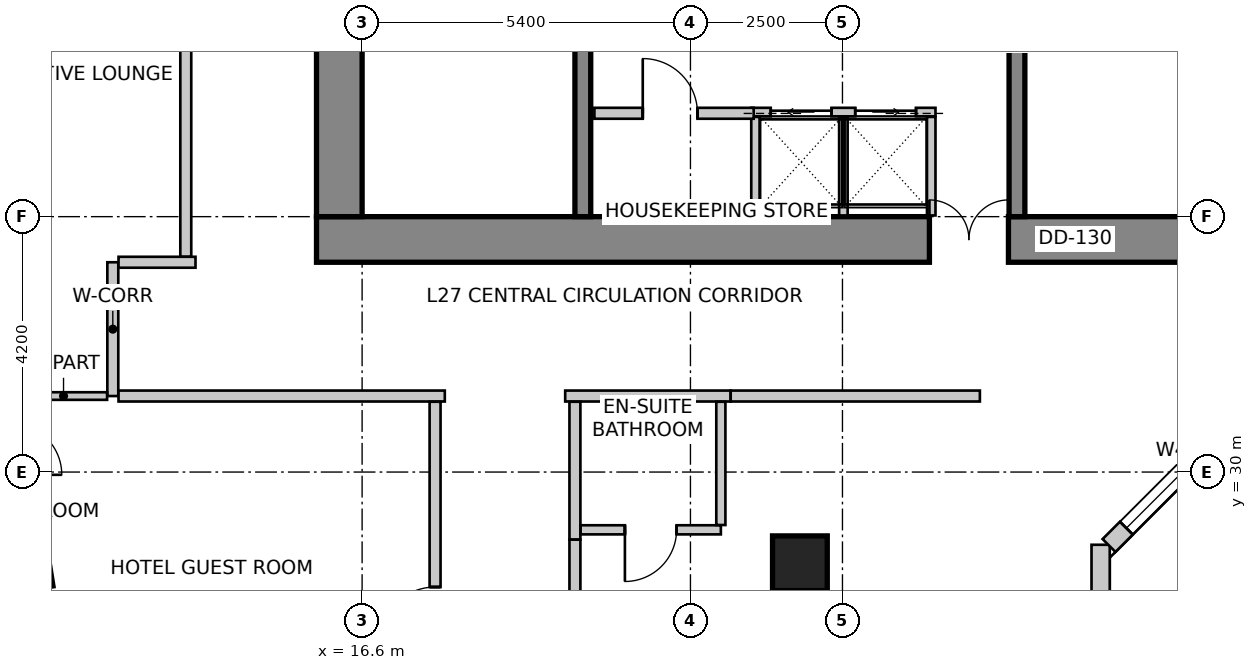
"""IFC4 building model, lengths in metres.
Left out: names, types, materials, properties, quantities, classifications, styles, units other than length and angle.
Written with IfcOpenShell. Run it as: python <this file> out.ifc"""

import sys

from ifc_helpers import new_model, si_unit, direction, frame, frame_2d, origin, origin_2d, place, context, subcontext, project, spatial, rectangle, extrude, source, transform, mapped, element, fill, save


model = new_model("IFC4")
c1 = context("Model", 3, precision=1e-05, world=origin(), true_north=direction((0.0, 1.0)))
c2 = subcontext(c1, "Body", "Model", "MODEL_VIEW")
j1 = project(units=[si_unit("LENGTHUNIT", "METRE"), si_unit("PLANEANGLEUNIT", "RADIAN")], contexts=[c1])
p1 = place(None, origin())
s1 = spatial("IfcSite", under=j1, at=p1, CompositionType="ELEMENT")
p2 = place(p1, origin())
s2 = spatial("IfcBuilding", under=s1, at=p2, CompositionType="ELEMENT")
p3 = place(p2, frame((0.0, 0.0, 114.2)))
s3 = spatial("IfcBuildingStorey", under=s2, at=p3, CompositionType="ELEMENT", Elevation=114.2)
p4 = place(p3, frame((15.85, 33.825, 0.0), z_axis=(0.0, 0.0, 1.0), x_axis=(1.0, 0.0, 0.0)))
e1 = element("IfcWall", 1, at=p4, inside=s3, PredefinedType="SHEAR", context=c2, shape_type="SweptSolid", body=[
    extrude(rectangle(XDim=15.9, YDim=0.75, at=frame_2d((7.95, 0.0))), origin(), (0.0, 0.0, 1.0), 3.6),
])
m1 = source(origin(), c2, "Body", "SweptSolid", [
    extrude(rectangle(XDim=1.3, YDim=2.15, at=frame_2d((0.65, 1.075))), frame((0.0, 0.385, 0.0), z_axis=(0.0, -1.0, 0.0), x_axis=(1.0, 0.0, 0.0)), (0.0, 0.0, 1.0), 0.77),
])
p5 = place(p4, frame((10.08, 0.0, 0.0)))
e2 = element("IfcOpeningElement", 2, at=p5, cuts=e1, PredefinedType="OPENING", context=c2, shape_type="MappedRepresentation", body=[
    mapped(m1, transform((0.0, 0.0, 0.0), scale=1.0)),
])
p6 = place(p3, frame((16.225, 34.2, 0.0), z_axis=(0.0, 0.0, 1.0), x_axis=(0.0, 1.0, 0.0)))
e3 = element("IfcWall", 3, at=p6, inside=s3, PredefinedType="SHEAR", context=c2, shape_type="SweptSolid", body=[
    extrude(rectangle(XDim=11.4, YDim=0.75, at=frame_2d((5.7, 0.0))), origin(), (0.0, 0.0, 1.0), 3.6),
])
m2 = source(origin(), c2, "Body", "SweptSolid", [
    extrude(rectangle(XDim=1.1, YDim=2.15, at=frame_2d((0.55, 1.075))), frame((0.0, 0.385, 0.0), z_axis=(0.0, -1.0, 0.0), x_axis=(1.0, 0.0, 0.0)), (0.0, 0.0, 1.0), 0.77),
])
p7 = place(p6, frame((7.15, 0.0, 0.0)))
e4 = element("IfcOpeningElement", 4, at=p7, cuts=e3, PredefinedType="OPENING", context=c2, shape_type="MappedRepresentation", body=[
    mapped(m2, transform((0.0, 0.0, 0.0), scale=1.0)),
])
p8 = place(p3, frame((20.23, 34.2, 0.0), z_axis=(0.0, 0.0, 1.0), x_axis=(0.0, 1.0, 0.0)))
e5 = element("IfcWall", 5, at=p8, inside=s3, PredefinedType="SHEAR", context=c2, shape_type="SweptSolid", body=[
    extrude(rectangle(XDim=9.06, YDim=0.26, at=frame_2d((4.53, 0.0))), origin(), (0.0, 0.0, 1.0), 3.6),
])
m3 = source(origin(), c2, "Body", "SweptSolid", [
    extrude(rectangle(XDim=1.1, YDim=2.15, at=frame_2d((0.55, 1.075))), frame((0.0, 0.14, 0.0), z_axis=(0.0, -1.0, 0.0), x_axis=(1.0, 0.0, 0.0)), (0.0, 0.0, 1.0), 0.28),
])
p9 = place(p8, frame((7.45, 0.0, 0.0)))
e6 = element("IfcOpeningElement", 6, at=p9, cuts=e5, PredefinedType="OPENING", context=c2, shape_type="MappedRepresentation", body=[
    mapped(m3, transform((0.0, 0.0, 0.0), scale=1.0)),
])
p10 = place(p3, frame((27.37, 34.2, 0.0), z_axis=(0.0, 0.0, 1.0), x_axis=(0.0, 1.0, 0.0)))
e7 = element("IfcWall", 7, at=p10, inside=s3, PredefinedType="SHEAR", context=c2, shape_type="SweptSolid", body=[
    extrude(rectangle(XDim=9.06, YDim=0.26, at=frame_2d((4.53, 0.0))), origin(), (0.0, 0.0, 1.0), 3.6),
])
p11 = place(p10, frame((7.45, 0.0, 0.0)))
e8 = element("IfcOpeningElement", 8, at=p11, cuts=e7, PredefinedType="OPENING", context=c2, shape_type="MappedRepresentation", body=[
    mapped(m3, transform((0.0, 0.0, 0.0), scale=1.0)),
])
m4 = source(origin(), c2, "Body", "SweptSolid", [
    extrude(rectangle(XDim=0.9, YDim=0.9, at=origin_2d()), origin(), (0.0, 0.0, 1.0), 3.6),
])
for number, where, z_axis, x_axis in (
    (9, (11.0, 28.5, 0.0), (0.0, 0.0, 1.0), (0.158, -0.987, 0.0)),
    (10, (23.8, 28.5, 0.0), (0.0, 0.0, 1.0), (1.0, 0.0, 0.0)),
):
    element("IfcColumn", number, at=place(p3, frame(where, z_axis=z_axis, x_axis=x_axis)), inside=s3, PredefinedType="COLUMN", context=c2, shape_type="MappedRepresentation", body=[
        mapped(m4, transform((0.0, 0.0, 0.0), scale=1.0)),
    ])
p12 = place(p3, frame((28.746, 27.577, 0.0), z_axis=(0.0, 0.0, 1.0), x_axis=(0.0, 1.0, 0.0)))
e11 = element("IfcWall", 11, at=p12, inside=s3, PredefinedType="SOLIDWALL", context=c2, shape_type="SweptSolid", body=[
    extrude(rectangle(XDim=1.228, YDim=0.3, at=frame_2d((0.614, 0.0))), origin(), (0.0, 0.0, 1.0), 3.35),
])
p13 = place(p3, frame((28.884, 28.792, 0.0), z_axis=(0.0, 0.0, 1.0), x_axis=(0.707064797706, 0.707148762175, 0.0)))
e12 = element("IfcWall", 12, at=p13, inside=s3, PredefinedType="SOLIDWALL", context=c2, shape_type="SweptSolid", body=[
    extrude(rectangle(XDim=2.908, YDim=0.3, at=frame_2d((1.454, 0.0))), origin(), (0.0, 0.0, 1.0), 3.35),
])
m5 = source(origin(), c2, "Body", "SweptSolid", [
    extrude(rectangle(XDim=2.1, YDim=2.0, at=frame_2d((1.05, 1.0))), frame((0.0, 0.16, 0.0), z_axis=(0.0, -1.0, 0.0), x_axis=(1.0, 0.0, 0.0)), (0.0, 0.0, 1.0), 0.32),
])
p14 = place(p13, frame((0.404, 0.0, 0.85)))
e13 = element("IfcOpeningElement", 13, at=p14, cuts=e12, PredefinedType="OPENING", context=c2, shape_type="MappedRepresentation", body=[
    mapped(m5, transform((0.0, 0.0, 0.0), scale=1.0)),
])
p15 = place(p3, frame((13.269, 47.134, 0.0), z_axis=(0.0, 0.0, 1.0), x_axis=(-0.319929596295, -0.947441319246, 0.0)))
e14 = element("IfcWall", 14, at=p15, inside=s3, PredefinedType="SOLIDWALL", context=c2, shape_type="SweptSolid", body=[
    extrude(rectangle(XDim=16.134, YDim=0.3, at=frame_2d((8.067, 0.0))), origin(), (0.0, 0.0, 1.0), 3.35),
])
p16 = place(p15, frame((2.426, 0.0, 0.85)))
e15 = element("IfcOpeningElement", 15, at=p16, cuts=e14, PredefinedType="OPENING", context=c2, shape_type="MappedRepresentation", body=[
    mapped(m5, transform((0.0, 0.0, 0.0), scale=1.0)),
])
m6 = source(origin(), c2, "Body", "SweptSolid", [
    extrude(rectangle(XDim=2.4, YDim=2.2, at=frame_2d((1.2, 1.1))), frame((0.0, 0.16, 0.0), z_axis=(0.0, -1.0, 0.0), x_axis=(1.0, 0.0, 0.0)), (0.0, 0.0, 1.0), 0.32),
])
p17 = place(p15, frame((7.211, 0.0, 0.85)))
e16 = element("IfcOpeningElement", 16, at=p17, cuts=e14, PredefinedType="OPENING", context=c2, shape_type="MappedRepresentation", body=[
    mapped(m6, transform((0.0, 0.0, 0.0), scale=1.0)),
])
p18 = place(p15, frame((12.297, 0.0, 0.85)))
e17 = element("IfcOpeningElement", 17, at=p18, cuts=e14, PredefinedType="OPENING", context=c2, shape_type="MappedRepresentation", body=[
    mapped(m5, transform((0.0, 0.0, 0.0), scale=1.0)),
])
p19 = place(p3, frame((8.185, 31.834, 0.0), z_axis=(0.0, 0.0, 1.0), x_axis=(0.189707113148, -0.981840725994, 0.0)))
e18 = element("IfcWall", 18, at=p19, inside=s3, PredefinedType="SOLIDWALL", context=c2, shape_type="SweptSolid", body=[
    extrude(rectangle(XDim=21.221, YDim=0.3, at=frame_2d((10.611, 0.0))), origin(), (0.0, 0.0, 1.0), 3.35),
])
m7 = source(origin(), c2, "Body", "SweptSolid", [
    extrude(rectangle(XDim=1.6, YDim=2.15, at=frame_2d((0.8, 1.075))), frame((0.0, 0.16, 0.0), z_axis=(0.0, -1.0, 0.0), x_axis=(1.0, 0.0, 0.0)), (0.0, 0.0, 1.0), 0.32),
])
p20 = place(p19, frame((8.441, 0.0, 0.0)))
e19 = element("IfcOpeningElement", 19, at=p20, cuts=e18, PredefinedType="OPENING", context=c2, shape_type="MappedRepresentation", body=[
    mapped(m7, transform((0.0, 0.0, 0.0), scale=1.0)),
])
m8 = source(origin(), c2, "Body", "SweptSolid", [
    extrude(rectangle(XDim=1.5, YDim=1.8, at=frame_2d((0.75, 0.9))), frame((0.0, 0.16, 0.0), z_axis=(0.0, -1.0, 0.0), x_axis=(1.0, 0.0, 0.0)), (0.0, 0.0, 1.0), 0.32),
])
p21 = place(p19, frame((0.977, 0.0, 0.85)))
e20 = element("IfcOpeningElement", 20, at=p21, cuts=e18, PredefinedType="OPENING", context=c2, shape_type="MappedRepresentation", body=[
    mapped(m8, transform((0.0, 0.0, 0.0), scale=1.0)),
])
p22 = place(p19, frame((4.219, 0.0, 0.85)))
e21 = element("IfcOpeningElement", 21, at=p22, cuts=e18, PredefinedType="OPENING", context=c2, shape_type="MappedRepresentation", body=[
    mapped(m6, transform((0.0, 0.0, 0.0), scale=1.0)),
])
p23 = place(p19, frame((11.871, 0.0, 0.85)))
e22 = element("IfcOpeningElement", 22, at=p23, cuts=e18, PredefinedType="OPENING", context=c2, shape_type="MappedRepresentation", body=[
    mapped(m6, transform((0.0, 0.0, 0.0), scale=1.0)),
])
p24 = place(p19, frame((17.241, 0.0, 0.85)))
e23 = element("IfcOpeningElement", 23, at=p24, cuts=e18, PredefinedType="OPENING", context=c2, shape_type="MappedRepresentation", body=[
    mapped(m5, transform((0.0, 0.0, 0.0), scale=1.0)),
])
p25 = place(p3, frame((23.0, 35.92, 0.0), z_axis=(0.0, 0.0, 1.0), x_axis=(1.0, 0.0, 0.0)))
e24 = element("IfcWall", 24, at=p25, inside=s3, PredefinedType="SOLIDWALL", context=c2, shape_type="SweptSolid", body=[
    extrude(rectangle(XDim=3.03, YDim=0.14, at=frame_2d((1.515, 0.0))), origin(), (0.0, 0.0, 1.0), 3.35),
])
m9 = source(origin(), c2, "Body", "SweptSolid", [
    extrude(rectangle(XDim=1.0, YDim=2.15, at=frame_2d((0.5, 1.075))), frame((0.0, 0.08, 0.0), z_axis=(0.0, -1.0, 0.0), x_axis=(1.0, 0.0, 0.0)), (0.0, 0.0, 1.0), 0.16),
])
p26 = place(p25, frame((0.32, 0.0, 0.0)))
e25 = element("IfcOpeningElement", 25, at=p26, cuts=e24, PredefinedType="OPENING", context=c2, shape_type="MappedRepresentation", body=[
    mapped(m9, transform((0.0, 0.0, 0.0), scale=1.0)),
])
p27 = place(p25, frame((1.71, 0.0, 0.0)))
e26 = element("IfcOpeningElement", 26, at=p27, cuts=e24, PredefinedType="OPENING", context=c2, shape_type="MappedRepresentation", body=[
    mapped(m9, transform((0.0, 0.0, 0.0), scale=1.0)),
])
for number, where, z_axis, x_axis in (
    (27, (25.96, 34.22, 0.0), (0.0, 0.0, 1.0), (0.0, 1.0, 0.0)),
    (28, (23.07, 34.22, 0.0), (0.0, 0.0, 1.0), (0.0, 1.0, 0.0)),
    (29, (24.515, 34.22, 0.0), (0.0, 0.0, 1.0), (0.0, 1.0, 0.0)),
):
    element("IfcWall", number, at=place(p3, frame(where, z_axis=z_axis, x_axis=x_axis)), inside=s3, PredefinedType="SOLIDWALL", context=c2, shape_type="SweptSolid", body=[
        extrude(rectangle(XDim=1.62, YDim=0.14, at=frame_2d((0.81, 0.0))), origin(), (0.0, 0.0, 1.0), 2.642),
    ])
p28 = place(p3, frame((20.42, 35.9, 0.0), z_axis=(0.0, 0.0, 1.0), x_axis=(1.0, 0.0, 0.0)))
e30 = element("IfcWall", 30, at=p28, inside=s3, PredefinedType="PARTITIONING", context=c2, shape_type="SweptSolid", body=[
    extrude(rectangle(XDim=2.62, YDim=0.18, at=frame_2d((1.31, 0.0))), origin(), (0.0, 0.0, 1.0), 3.35),
])
m10 = source(origin(), c2, "Body", "SweptSolid", [
    extrude(rectangle(XDim=0.9, YDim=2.15, at=frame_2d((0.45, 1.075))), frame((0.0, 0.1, 0.0), z_axis=(0.0, -1.0, 0.0), x_axis=(1.0, 0.0, 0.0)), (0.0, 0.0, 1.0), 0.2),
])
p29 = place(p28, frame((0.796, 0.0, 0.0)))
e31 = element("IfcOpeningElement", 31, at=p29, cuts=e30, PredefinedType="OPENING", context=c2, shape_type="MappedRepresentation", body=[
    mapped(m10, transform((0.0, 0.0, 0.0), scale=1.0)),
])
p30 = place(p3, frame((12.5, 31.25, 0.0), z_axis=(0.0, 0.0, 1.0), x_axis=(0.0, 1.0, 0.0)))
e32 = element("IfcWall", 32, at=p30, inside=s3, PredefinedType="PARTITIONING", context=c2, shape_type="SweptSolid", body=[
    extrude(rectangle(XDim=2.2, YDim=0.18, at=frame_2d((1.1, 0.0))), origin(), (0.0, 0.0, 1.0), 2.935),
])
p31 = place(p3, frame((12.594, 33.45, 0.0), z_axis=(0.0, 0.0, 1.0), x_axis=(1.0, 0.0, 0.0)))
e33 = element("IfcWall", 33, at=p31, inside=s3, PredefinedType="PARTITIONING", context=c2, shape_type="SweptSolid", body=[
    extrude(rectangle(XDim=1.266, YDim=0.18, at=frame_2d((0.633, 0.0))), origin(), (0.0, 0.0, 1.0), 3.35),
])
p32 = place(p3, frame((17.96, 31.25, 0.0), z_axis=(0.0, 0.0, 1.0), x_axis=(-1.0, 0.0, 0.0)))
e34 = element("IfcWall", 34, at=p32, inside=s3, PredefinedType="PARTITIONING", context=c2, shape_type="SweptSolid", body=[
    extrude(rectangle(XDim=5.366, YDim=0.18, at=frame_2d((2.683, 0.0))), origin(), (0.0, 0.0, 1.0), 2.935),
])
p33 = place(p3, frame((22.66, 31.25, 0.0), z_axis=(0.0, 0.0, 1.0), x_axis=(-1.0, 0.0, 0.0)))
e35 = element("IfcWall", 35, at=p33, inside=s3, PredefinedType="PARTITIONING", context=c2, shape_type="SweptSolid", body=[
    extrude(rectangle(XDim=2.72, YDim=0.18, at=frame_2d((1.36, 0.0))), origin(), (0.0, 0.0, 1.0), 2.935),
])
p34 = place(p3, frame((26.76, 31.25, 0.0), z_axis=(0.0, 0.0, 1.0), x_axis=(-1.0, 0.0, 0.0)))
e36 = element("IfcWall", 36, at=p34, inside=s3, PredefinedType="PARTITIONING", context=c2, shape_type="SweptSolid", body=[
    extrude(rectangle(XDim=4.098, YDim=0.18, at=frame_2d((2.049, 0.0))), origin(), (0.0, 0.0, 1.0), 3.35),
])
p35 = place(p3, frame((13.7, 33.544, 0.0), z_axis=(0.0, 0.0, 1.0), x_axis=(0.0, 1.0, 0.0)))
e37 = element("IfcWall", 37, at=p35, inside=s3, PredefinedType="PARTITIONING", context=c2, shape_type="SweptSolid", body=[
    extrude(rectangle(XDim=13.86, YDim=0.18, at=frame_2d((6.93, 0.0))), origin(), (0.0, 0.0, 1.0), 2.492),
])
p36 = place(p35, frame((4.253, 0.0, 0.0)))
e38 = element("IfcOpeningElement", 38, at=p36, cuts=e37, PredefinedType="OPENING", context=c2, shape_type="MappedRepresentation", body=[
    mapped(m10, transform((0.0, 0.0, 0.0), scale=1.0)),
])
p37 = place(p3, frame((12.406, 31.25, 0.0), z_axis=(0.0, 0.0, 1.0), x_axis=(-1.0, 0.0, 0.0)))
e39 = element("IfcWall", 39, at=p37, inside=s3, PredefinedType="PARTITIONING", context=c2, shape_type="SweptSolid", body=[
    extrude(rectangle(XDim=1.433, YDim=0.125, at=frame_2d((0.717, 0.0))), origin(), (0.0, 0.0, 1.0), 2.492),
])
p38 = place(p3, frame((17.8, 24.162, 0.0), z_axis=(0.0, 0.0, 1.0), x_axis=(0.0, 1.0, 0.0)))
e40 = element("IfcWall", 40, at=p38, inside=s3, PredefinedType="PARTITIONING", context=c2, shape_type="SweptSolid", body=[
    extrude(rectangle(XDim=6.994, YDim=0.18, at=frame_2d((3.497, 0.0))), origin(), (0.0, 0.0, 1.0), 2.788),
])
p39 = place(p38, frame((3.047, 0.0, 0.0)))
e41 = element("IfcOpeningElement", 41, at=p39, cuts=e40, PredefinedType="OPENING", context=c2, shape_type="MappedRepresentation", body=[
    mapped(m10, transform((0.0, 0.0, 0.0), scale=1.0)),
])
p40 = place(p3, frame((20.1, 31.156, 0.0), z_axis=(0.0, 0.0, 1.0), x_axis=(0.0, -1.0, 0.0)))
e42 = element("IfcWall", 42, at=p40, inside=s3, PredefinedType="PARTITIONING", context=c2, shape_type="SweptSolid", body=[
    extrude(rectangle(XDim=2.266, YDim=0.18, at=frame_2d((1.133, 0.0))), origin(), (0.0, 0.0, 1.0), 2.935),
])
p41 = place(p3, frame((20.1, 28.888, 0.0), z_axis=(0.0, 0.0, 1.0), x_axis=(0.0, -1.0, 0.0)))
e43 = element("IfcWall", 43, at=p41, inside=s3, PredefinedType="PARTITIONING", context=c2, shape_type="SweptSolid", body=[
    extrude(rectangle(XDim=4.726, YDim=0.18, at=frame_2d((2.363, 0.0))), origin(), (0.0, 0.0, 1.0), 2.788),
])
p42 = place(p41, frame((1.853, 0.0, 0.0)))
e44 = element("IfcOpeningElement", 44, at=p42, cuts=e43, PredefinedType="OPENING", context=c2, shape_type="MappedRepresentation", body=[
    mapped(m10, transform((0.0, 0.0, 0.0), scale=1.0)),
])
p43 = place(p3, frame((22.5, 29.05, 0.0), z_axis=(0.0, 0.0, 1.0), x_axis=(-1.0, 0.0, 0.0)))
e45 = element("IfcWall", 45, at=p43, inside=s3, PredefinedType="PARTITIONING", context=c2, shape_type="SweptSolid", body=[
    extrude(rectangle(XDim=2.306, YDim=0.15, at=frame_2d((1.153, 0.0))), origin(), (0.0, 0.0, 1.0), 2.935),
])
m11 = source(origin(), c2, "Body", "SweptSolid", [
    extrude(rectangle(XDim=0.85, YDim=2.15, at=frame_2d((0.425, 1.075))), frame((0.0, 0.085, 0.0), z_axis=(0.0, -1.0, 0.0), x_axis=(1.0, 0.0, 0.0)), (0.0, 0.0, 1.0), 0.17),
])
p44 = place(p43, frame((0.728, 0.0, 0.0)))
e46 = element("IfcOpeningElement", 46, at=p44, cuts=e45, PredefinedType="OPENING", context=c2, shape_type="MappedRepresentation", body=[
    mapped(m11, transform((0.0, 0.0, 0.0), scale=1.0)),
])
p45 = place(p3, frame((22.5, 31.156, 0.0), z_axis=(0.0, 0.0, 1.0), x_axis=(0.0, -1.0, 0.0)))
e47 = element("IfcWall", 47, at=p45, inside=s3, PredefinedType="PARTITIONING", context=c2, shape_type="SweptSolid", body=[
    extrude(rectangle(XDim=2.027, YDim=0.15, at=frame_2d((1.014, 0.0))), origin(), (0.0, 0.0, 1.0), 2.935),
])
m12 = source(origin(), c2, "Body", "SweptSolid", [
    extrude(rectangle(XDim=2.1, YDim=2.0, at=frame_2d((1.05, 1.0))), frame((0.0, -0.015, 0.0), z_axis=(0.0, -1.0, 0.0), x_axis=(1.0, 0.0, 0.0)), (0.0, 0.0, 1.0), 0.06),
])
p46 = place(p14, origin())
e48 = element("IfcWindow", 48, at=p46, inside=s3, PartitioningType="SINGLE_PANEL", PredefinedType="WINDOW", context=c2, shape_type="MappedRepresentation", body=[
    mapped(m12, transform((0.0, 0.0, 0.0), scale=1.0)),
])
fill(e13, e48)
m13 = source(origin(), c2, "Body", "SweptSolid", [
    extrude(rectangle(XDim=1.0, YDim=2.15, at=frame_2d((0.5, 1.075))), frame((0.0, 0.025, 0.0), z_axis=(0.0, -1.0, 0.0), x_axis=(1.0, 0.0, 0.0)), (0.0, 0.0, 1.0), 0.05),
])
p47 = place(p26, origin())
e49 = element("IfcDoor", 49, at=p47, inside=s3, OperationType="SLIDING_TO_LEFT", PredefinedType="DOOR", context=c2, shape_type="MappedRepresentation", body=[
    mapped(m13, transform((0.0, 0.0, 0.0), scale=1.0)),
])
fill(e25, e49)
p48 = place(p27, origin())
e50 = element("IfcDoor", 50, at=p48, inside=s3, OperationType="SLIDING_TO_RIGHT", PredefinedType="DOOR", context=c2, shape_type="MappedRepresentation", body=[
    mapped(m13, transform((0.0, 0.0, 0.0), scale=1.0)),
])
fill(e26, e50)
m14 = source(origin(), c2, "Body", "SweptSolid", [
    extrude(rectangle(XDim=1.3, YDim=2.15, at=frame_2d((0.65, 1.075))), frame((0.0, 0.025, 0.0), z_axis=(0.0, -1.0, 0.0), x_axis=(1.0, 0.0, 0.0)), (0.0, 0.0, 1.0), 0.05),
])
p49 = place(p5, origin())
e51 = element("IfcDoor", 51, at=p49, inside=s3, OperationType="DOUBLE_DOOR_SINGLE_SWING", PredefinedType="DOOR", context=c2, shape_type="MappedRepresentation", body=[
    mapped(m14, transform((0.0, 0.0, 0.0), scale=1.0)),
])
fill(e2, e51)
m15 = source(origin(), c2, "Body", "SweptSolid", [
    extrude(rectangle(XDim=0.9, YDim=2.15, at=frame_2d((0.45, 1.075))), frame((0.0, 0.025, 0.0), z_axis=(0.0, -1.0, 0.0), x_axis=(1.0, 0.0, 0.0)), (0.0, 0.0, 1.0), 0.05),
])
p50 = place(p29, origin())
e52 = element("IfcDoor", 52, at=p50, inside=s3, OperationType="SINGLE_SWING_LEFT", PredefinedType="DOOR", context=c2, shape_type="MappedRepresentation", body=[
    mapped(m15, transform((0.0, 0.0, 0.0), scale=1.0)),
])
fill(e31, e52)
p51 = place(p39, origin())
e53 = element("IfcDoor", 53, at=p51, inside=s3, OperationType="SINGLE_SWING_LEFT", PredefinedType="DOOR", context=c2, shape_type="MappedRepresentation", body=[
    mapped(m15, transform((0.0, 0.0, 0.0), scale=1.0)),
])
fill(e41, e53)
m16 = source(origin(), c2, "Body", "SweptSolid", [
    extrude(rectangle(XDim=0.85, YDim=2.15, at=frame_2d((0.425, 1.075))), frame((0.0, 0.025, 0.0), z_axis=(0.0, -1.0, 0.0), x_axis=(1.0, 0.0, 0.0)), (0.0, 0.0, 1.0), 0.05),
])
p52 = place(p44, origin())
e54 = element("IfcDoor", 54, at=p52, inside=s3, OperationType="SINGLE_SWING_RIGHT", PredefinedType="DOOR", context=c2, shape_type="MappedRepresentation", body=[
    mapped(m16, transform((0.0, 0.0, 0.0), scale=1.0)),
])
fill(e46, e54)
save(model, sys.argv[1])
